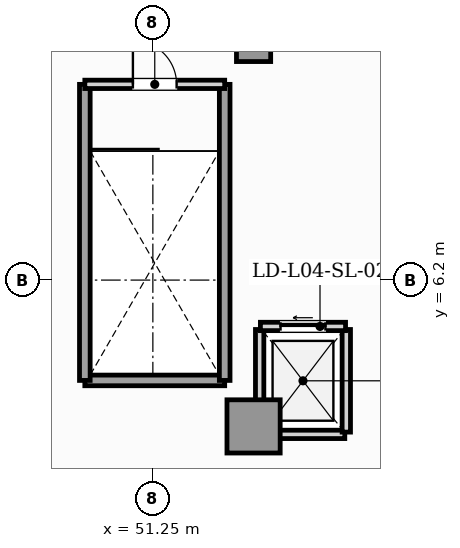
"""IFC4 building model, lengths in metres.
Left out: names, types, materials, properties, quantities, classifications, styles, units other than length and angle.
Written with IfcOpenShell. Run it as: python <this file> out.ifc"""

import sys

from ifc_helpers import new_model, si_unit, direction, frame, frame_2d, origin, origin_2d, place, context, subcontext, project, spatial, rectangle, hollow_rectangle, extrude, element, fill, save


model = new_model("IFC4")
c1 = context("Model", 3, precision=1e-05, world=origin(), true_north=direction((0.0, 1.0)))
c2 = subcontext(c1, "Body", "Model", "MODEL_VIEW")
j1 = project(units=[si_unit("LENGTHUNIT", "METRE"), si_unit("PLANEANGLEUNIT", "RADIAN")], contexts=[c1])
p1 = place(None, origin())
s1 = spatial("IfcSite", under=j1, at=p1, CompositionType="ELEMENT")
p2 = place(p1, origin())
s2 = spatial("IfcBuilding", under=s1, at=p2, CompositionType="ELEMENT")
p3 = place(p2, frame((0.0, 0.0, 19.8)))
s3 = spatial("IfcBuildingStorey", under=s2, at=p3, CompositionType="ELEMENT", Elevation=19.8)
p4 = place(p3, frame((53.9, 2.35, 0.0), z_axis=(0.0, 0.0, 1.0), x_axis=(1.0, 0.0, 0.0)))
e1 = element("IfcColumn", 1, at=p4, inside=s3, PredefinedType="USERDEFINED", context=c2, shape_type="SweptSolid", body=[
    extrude(hollow_rectangle(XDim=1.4, YDim=1.4, WallThickness=0.08, at=origin_2d()), origin(), (0.0, 0.0, 1.0), 4.8),
])
p5 = place(p3, frame((53.9, 12.4, 0.0), z_axis=(0.0, 0.0, 1.0), x_axis=(1.0, 0.0, 0.0)))
e2 = element("IfcColumn", 2, at=p5, inside=s3, PredefinedType="COLUMN", context=c2, shape_type="SweptSolid", body=[
    extrude(rectangle(XDim=0.9, YDim=0.9, at=origin_2d()), origin(), (0.0, 0.0, 1.0), 4.8),
])
p6 = place(p3, frame((54.1, 2.14, 0.0), z_axis=(0.0, 0.0, 1.0), x_axis=(1.0, 0.0, 0.0)))
e3 = element("IfcWall", 3, at=p6, inside=s3, PredefinedType="SOLIDWALL", context=c2, shape_type="SweptSolid", body=[
    extrude(rectangle(XDim=2.2, YDim=0.22, at=frame_2d((1.1, 0.0))), origin(), (0.0, 0.0, 1.0), 4.4),
])
p7 = place(p3, frame((54.06, 2.2, 0.0), z_axis=(0.0, 0.0, 1.0), x_axis=(0.0, 1.0, 0.0)))
e4 = element("IfcWall", 4, at=p7, inside=s3, PredefinedType="SOLIDWALL", context=c2, shape_type="SweptSolid", body=[
    extrude(rectangle(XDim=2.7, YDim=0.22, at=frame_2d((1.35, 0.0))), origin(), (0.0, 0.0, 1.0), 3.867),
])
p8 = place(p3, frame((56.34, 2.2, 0.0), z_axis=(0.0, 0.0, 1.0), x_axis=(0.0, 1.0, 0.0)))
e5 = element("IfcWall", 5, at=p8, inside=s3, PredefinedType="SOLIDWALL", context=c2, shape_type="SweptSolid", body=[
    extrude(rectangle(XDim=2.7, YDim=0.22, at=frame_2d((1.35, 0.0))), origin(), (0.0, 0.0, 1.0), 4.4),
])
p9 = place(p3, frame((54.08, 4.98, 0.0), z_axis=(0.0, 0.0, 1.0), x_axis=(1.0, 0.0, 0.0)))
e6 = element("IfcWall", 6, at=p9, inside=s3, PredefinedType="SOLIDWALL", context=c2, shape_type="SweptSolid", body=[
    extrude(rectangle(XDim=2.24, YDim=0.22, at=frame_2d((1.12, 0.0))), origin(), (0.0, 0.0, 1.0), 4.4),
])
p10 = place(p9, frame((0.53, 0.0, 0.0)))
e7 = element("IfcOpeningElement", 7, at=p10, cuts=e6, PredefinedType="OPENING", context=c2, shape_type="SweptSolid", body=[
    extrude(rectangle(XDim=1.18, YDim=2.2, at=frame_2d((0.59, 1.1))), frame((0.0, 0.12, 0.0), z_axis=(0.0, -1.0, 0.0), x_axis=(1.0, 0.0, 0.0)), (0.0, 0.0, 1.0), 0.24),
])
p11 = place(p3, frame((49.46, 3.56, 0.0), z_axis=(0.0, 0.0, 1.0), x_axis=(1.0, 0.0, 0.0)))
e8 = element("IfcWall", 8, at=p11, inside=s3, PredefinedType="SHEAR", context=c2, shape_type="SweptSolid", body=[
    extrude(rectangle(XDim=3.68, YDim=0.28, at=frame_2d((1.84, 0.0))), origin(), (0.0, 0.0, 1.0), 4.4),
])
for number, where, z_axis, x_axis in (
    (9, (49.46, 3.56, 0.0), (0.0, 0.0, 1.0), (0.0, 1.0, 0.0)),
    (10, (53.14, 3.56, 0.0), (0.0, 0.0, 1.0), (0.0, 1.0, 0.0)),
):
    element("IfcWall", number, at=place(p3, frame(where, z_axis=z_axis, x_axis=x_axis)), inside=s3, PredefinedType="SHEAR", context=c2, shape_type="SweptSolid", body=[
        extrude(rectangle(XDim=7.79, YDim=0.28, at=frame_2d((3.895, 0.0))), origin(), (0.0, 0.0, 1.0), 4.4),
    ])
p12 = place(p3, frame((49.46, 11.35, 0.0), z_axis=(0.0, 0.0, 1.0), x_axis=(1.0, 0.0, 0.0)))
e11 = element("IfcWall", 11, at=p12, inside=s3, PredefinedType="SOLIDWALL", context=c2, shape_type="SweptSolid", body=[
    extrude(rectangle(XDim=3.68, YDim=0.22, at=frame_2d((1.84, 0.0))), origin(), (0.0, 0.0, 1.0), 4.4),
])
p13 = place(p12, frame((1.265, 0.0, 0.0)))
e12 = element("IfcOpeningElement", 12, at=p13, cuts=e11, PredefinedType="OPENING", context=c2, shape_type="SweptSolid", body=[
    extrude(rectangle(XDim=1.15, YDim=2.2, at=frame_2d((0.575, 1.1))), frame((0.0, 0.12, 0.0), z_axis=(0.0, -1.0, 0.0), x_axis=(1.0, 0.0, 0.0)), (0.0, 0.0, 1.0), 0.24),
])
p14 = place(p10, origin())
e13 = element("IfcDoor", 13, at=p14, inside=s3, OperationType="SLIDING_TO_LEFT", PredefinedType="DOOR", context=c2, shape_type="SweptSolid", body=[
    extrude(rectangle(XDim=1.18, YDim=2.2, at=frame_2d((0.59, 1.1))), frame((0.0, 0.025, 0.0), z_axis=(0.0, -1.0, 0.0), x_axis=(1.0, 0.0, 0.0)), (0.0, 0.0, 1.0), 0.05),
])
fill(e7, e13)
p15 = place(p13, origin())
e14 = element("IfcDoor", 14, at=p15, inside=s3, OperationType="SINGLE_SWING_LEFT", PredefinedType="DOOR", context=c2, shape_type="SweptSolid", body=[
    extrude(rectangle(XDim=1.15, YDim=2.2, at=frame_2d((0.575, 1.1))), frame((0.0, 0.025, 0.0), z_axis=(0.0, -1.0, 0.0), x_axis=(1.0, 0.0, 0.0)), (0.0, 0.0, 1.0), 0.05),
])
fill(e12, e14)
save(model, sys.argv[1])
